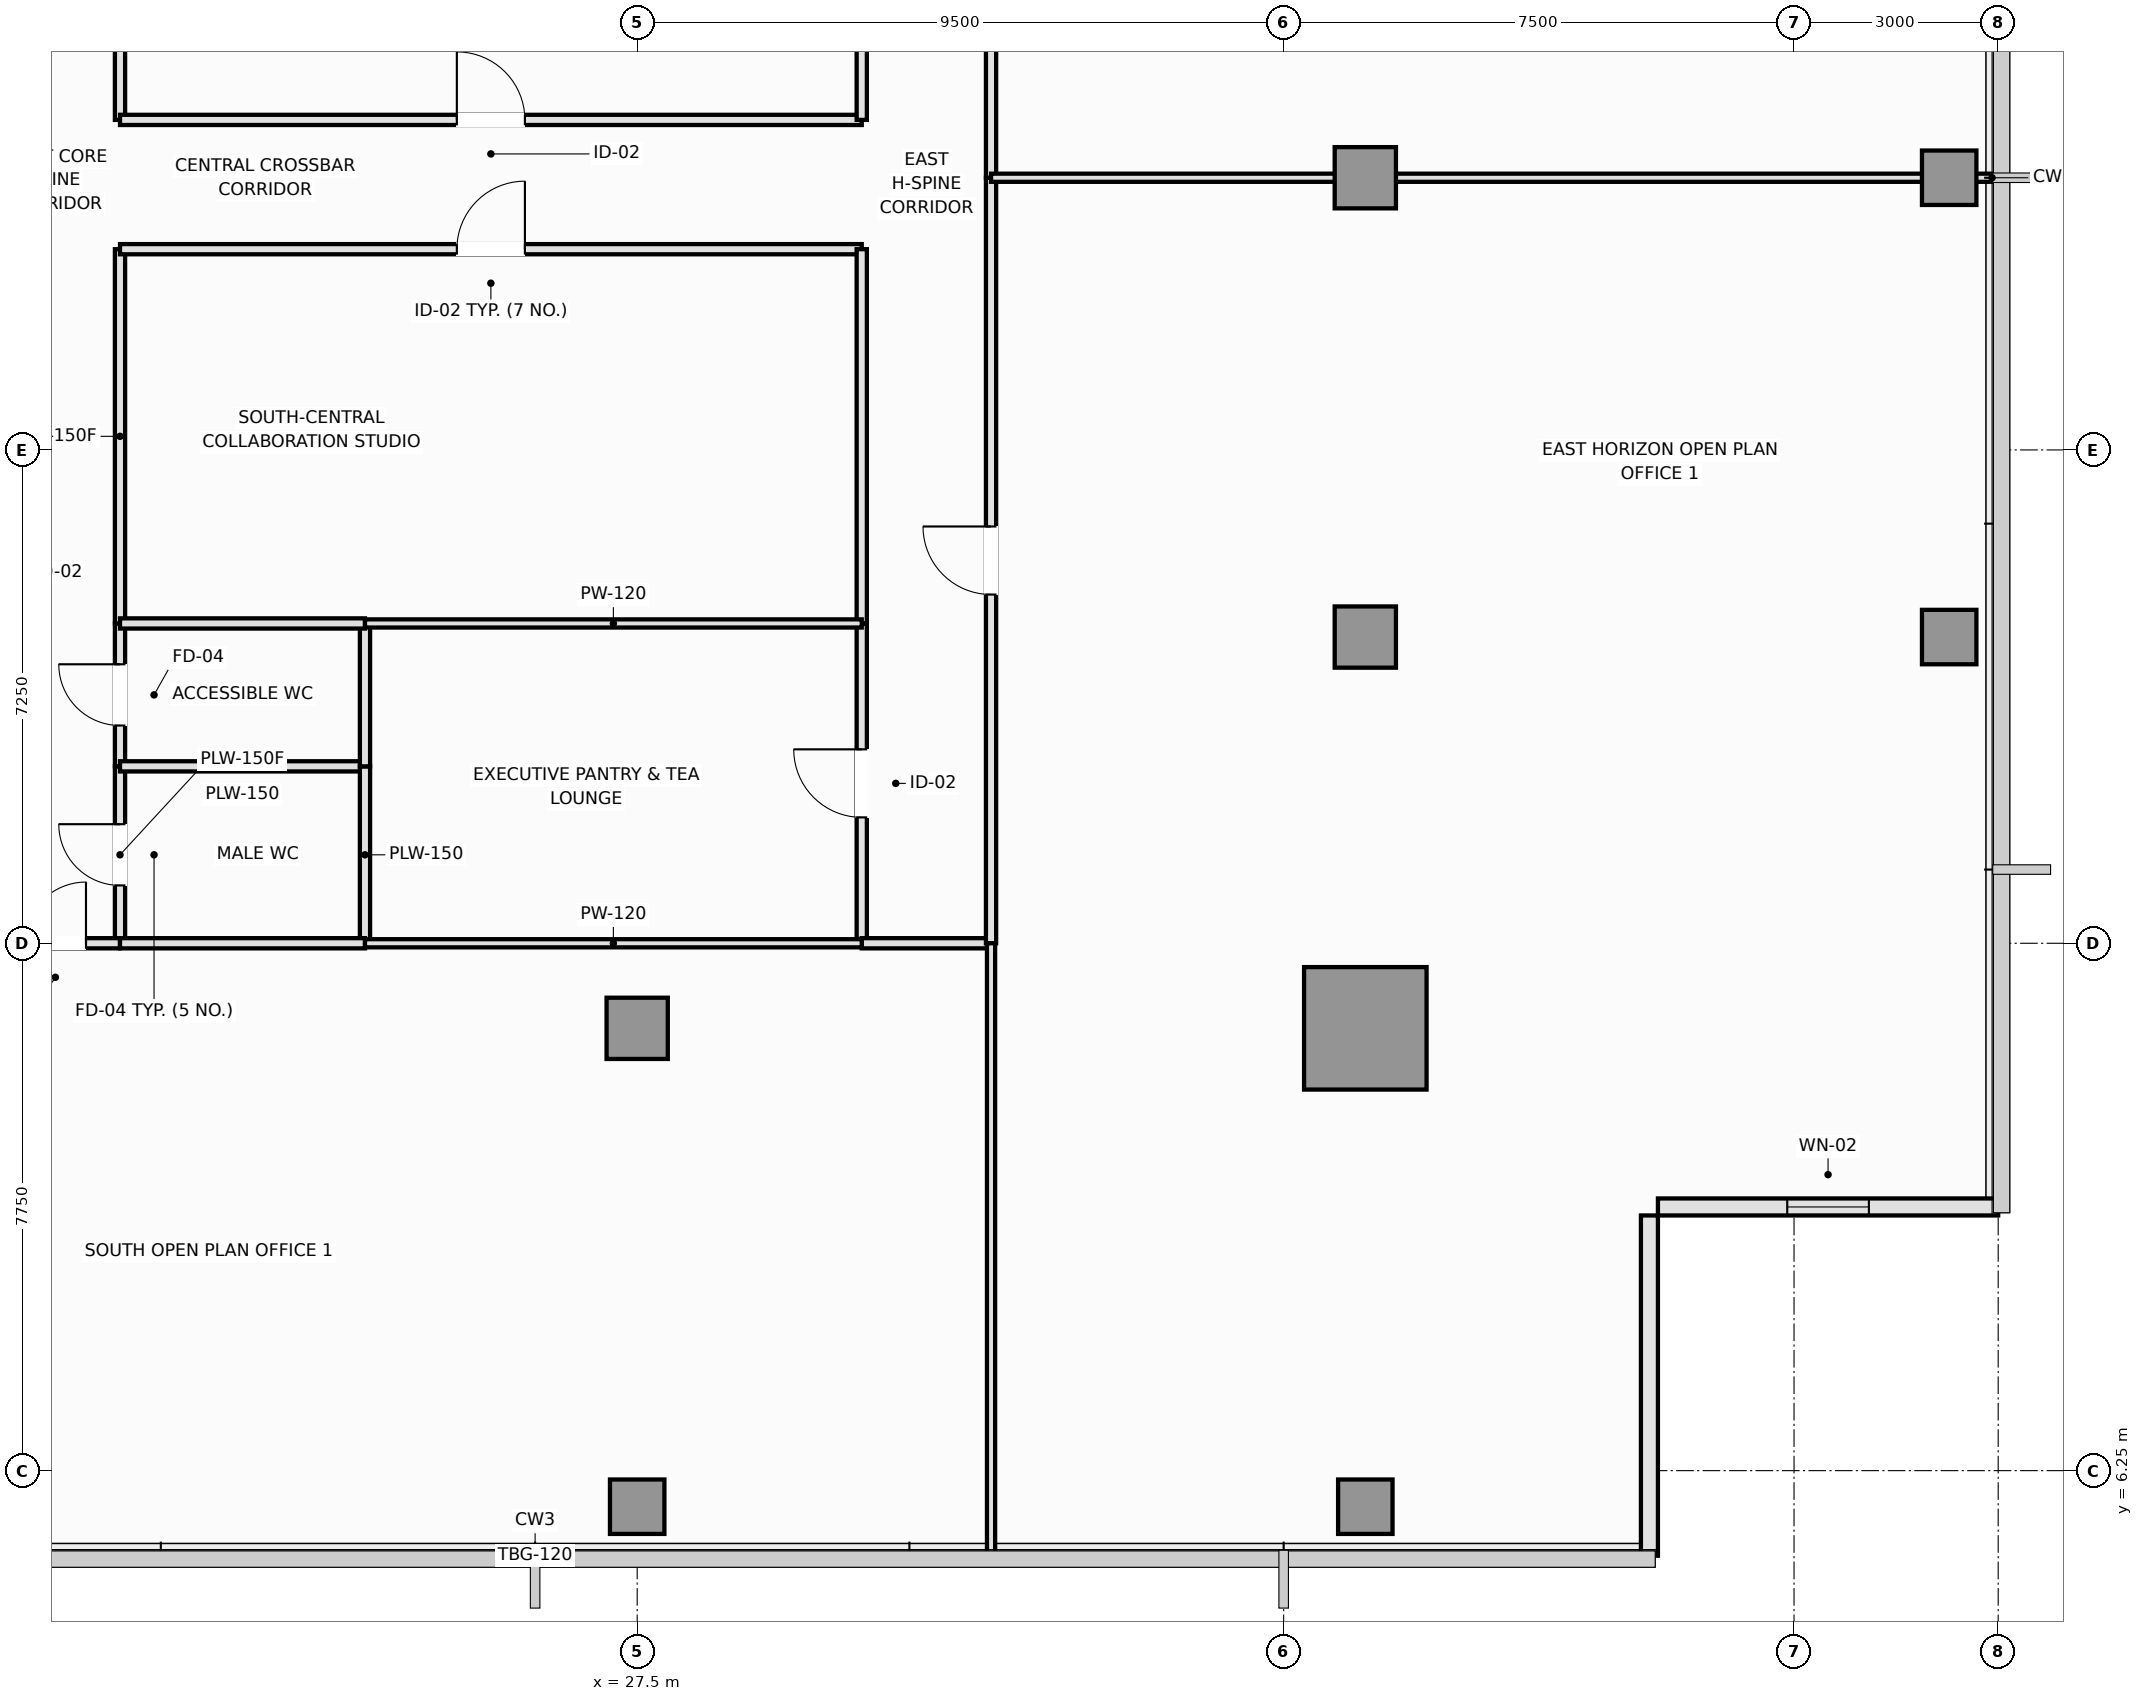
"""IFC4 building model, lengths in metres.
Left out: names, types, materials, properties, quantities, classifications, styles, units other than length and angle.
Written with IfcOpenShell. Run it as: python <this file> out.ifc"""

import sys

from ifc_helpers import new_model, si_unit, direction, frame, frame_2d, origin, origin_2d, place, context, subcontext, project, spatial, rectangle, extrude, element, fill, save


model = new_model("IFC4")
c1 = context("Model", 3, precision=1e-05, world=origin(), true_north=direction((0.0, 1.0)))
c2 = subcontext(c1, "Body", "Model", "MODEL_VIEW")
j1 = project(units=[si_unit("LENGTHUNIT", "METRE"), si_unit("PLANEANGLEUNIT", "RADIAN")], contexts=[c1])
p1 = place(None, origin())
s1 = spatial("IfcSite", under=j1, at=p1, CompositionType="ELEMENT")
p2 = place(p1, origin())
s2 = spatial("IfcBuilding", under=s1, at=p2, CompositionType="ELEMENT")
p3 = place(p2, frame((0.0, 0.0, 188.05)))
s3 = spatial("IfcBuildingStorey", under=s2, at=p3, CompositionType="ELEMENT", Elevation=188.05)
p4 = place(p3, frame((38.2, 12.75, 0.0), z_axis=(0.0, 0.0, 1.0), x_axis=(1.0, 0.0, 0.0)))
e1 = element("IfcColumn", 1, at=p4, inside=s3, PredefinedType="COLUMN", context=c2, shape_type="SweptSolid", body=[
    extrude(rectangle(XDim=1.8, YDim=1.8, at=origin_2d()), origin(), (0.0, 0.0, 1.0), 3.55),
])
for number, where, z_axis, x_axis in (
    (2, (27.5, 12.75, 0.0), (0.0, 0.0, 1.0), (1.0, 0.0, 0.0)),
    (3, (38.2, 18.5, 0.0), (0.0, 0.0, 1.0), (1.0, 0.0, 0.0)),
    (4, (38.2, 25.25, 0.0), (0.0, 0.0, 1.0), (1.0, 0.0, 0.0)),
):
    element("IfcColumn", number, at=place(p3, frame(where, z_axis=z_axis, x_axis=x_axis)), inside=s3, PredefinedType="COLUMN", context=c2, shape_type="SweptSolid", body=[
        extrude(rectangle(XDim=0.9, YDim=0.9, at=origin_2d()), origin(), (0.0, 0.0, 1.0), 3.55),
    ])
for number, where, z_axis, x_axis in (
    (5, (46.78, 18.5, 0.0), (0.0, 0.0, 1.0), (1.0, 0.0, 0.0)),
    (6, (46.78, 25.25, 0.0), (0.0, 0.0, 1.0), (1.0, 0.0, 0.0)),
    (7, (27.5, 5.72, 0.0), (0.0, 0.0, 1.0), (1.0, 0.0, 0.0)),
    (8, (38.2, 5.72, 0.0), (0.0, 0.0, 1.0), (1.0, 0.0, 0.0)),
):
    element("IfcColumn", number, at=place(p3, frame(where, z_axis=z_axis, x_axis=x_axis)), inside=s3, PredefinedType="COLUMN", context=c2, shape_type="SweptSolid", body=[
        extrude(rectangle(XDim=0.8, YDim=0.8, at=origin_2d()), origin(), (0.0, 0.0, 1.0), 3.55),
    ])
p5 = place(p3, frame((42.375, 5.0, 0.0), z_axis=(0.0, 0.0, 1.0), x_axis=(0.0, 1.0, 0.0)))
e9 = element("IfcWall", 9, at=p5, inside=s3, PredefinedType="SOLIDWALL", context=c2, shape_type="SweptSolid", body=[
    extrude(rectangle(XDim=5.0, YDim=0.25, at=frame_2d((2.5, 0.0))), origin(), (0.0, 0.0, 1.0), 3.37),
])
p6 = place(p3, frame((42.5, 10.125, 0.0), z_axis=(0.0, 0.0, 1.0), x_axis=(1.0, 0.0, 0.0)))
e10 = element("IfcWall", 10, at=p6, inside=s3, PredefinedType="SOLIDWALL", context=c2, shape_type="SweptSolid", body=[
    extrude(rectangle(XDim=5.0, YDim=0.25, at=frame_2d((2.5, 0.0))), origin(), (0.0, 0.0, 1.0), 3.37),
])
p7 = place(p6, frame((1.9, 0.0, 0.9)))
e11 = element("IfcOpeningElement", 11, at=p7, cuts=e10, PredefinedType="OPENING", context=c2, shape_type="SweptSolid", body=[
    extrude(rectangle(XDim=1.2, YDim=1.8, at=frame_2d((0.6, 0.9))), frame((0.0, 0.135, 0.0), z_axis=(0.0, -1.0, 0.0), x_axis=(1.0, 0.0, 0.0)), (0.0, 0.0, 1.0), 0.27),
])
p8 = place(p3, frame((19.9, 14.0, 0.0), z_axis=(0.0, 0.0, 1.0), x_axis=(0.0, 1.0, 0.0)))
e12 = element("IfcWall", 12, at=p8, inside=s3, PredefinedType="PLUMBINGWALL", context=c2, shape_type="SweptSolid", body=[
    extrude(rectangle(XDim=2.6, YDim=0.15, at=frame_2d((1.3, 0.0))), origin(), (0.0, 0.0, 1.0), 3.37),
])
p9 = place(p8, frame((0.85, 0.0, 0.0)))
e13 = element("IfcOpeningElement", 13, at=p9, cuts=e12, PredefinedType="OPENING", context=c2, shape_type="SweptSolid", body=[
    extrude(rectangle(XDim=0.9, YDim=2.1, at=frame_2d((0.45, 1.05))), frame((0.0, 0.085, 0.0), z_axis=(0.0, -1.0, 0.0), x_axis=(1.0, 0.0, 0.0)), (0.0, 0.0, 1.0), 0.17),
])
p10 = place(p3, frame((19.9, 16.6, 0.0), z_axis=(0.0, 0.0, 1.0), x_axis=(0.0, 1.0, 0.0)))
e14 = element("IfcWall", 14, at=p10, inside=s3, PredefinedType="PLUMBINGWALL", context=c2, shape_type="SweptSolid", body=[
    extrude(rectangle(XDim=2.1, YDim=0.15, at=frame_2d((1.05, 0.0))), origin(), (0.0, 0.0, 1.0), 3.37),
])
p11 = place(p10, frame((0.6, 0.0, 0.0)))
e15 = element("IfcOpeningElement", 15, at=p11, cuts=e14, PredefinedType="OPENING", context=c2, shape_type="SweptSolid", body=[
    extrude(rectangle(XDim=0.9, YDim=2.1, at=frame_2d((0.45, 1.05))), frame((0.0, 0.085, 0.0), z_axis=(0.0, -1.0, 0.0), x_axis=(1.0, 0.0, 0.0)), (0.0, 0.0, 1.0), 0.17),
])
p12 = place(p3, frame((19.9, 18.7, 0.0), z_axis=(0.0, 0.0, 1.0), x_axis=(0.0, 1.0, 0.0)))
e16 = element("IfcWall", 16, at=p12, inside=s3, PredefinedType="PARTITIONING", context=c2, shape_type="SweptSolid", body=[
    extrude(rectangle(XDim=5.5, YDim=0.15, at=frame_2d((2.75, 0.0))), origin(), (0.0, 0.0, 1.0), 3.37),
])
p13 = place(p3, frame((19.9, 26.1, 0.0), z_axis=(0.0, 0.0, 1.0), x_axis=(0.0, 1.0, 0.0)))
e17 = element("IfcWall", 17, at=p13, inside=s3, PredefinedType="PARTITIONING", context=c2, shape_type="SweptSolid", body=[
    extrude(rectangle(XDim=3.8, YDim=0.15, at=frame_2d((1.9, 0.0))), origin(), (0.0, 0.0, 1.0), 3.37),
])
p14 = place(p3, frame((18.0, 14.0, 0.0), z_axis=(0.0, 0.0, 1.0), x_axis=(1.0, 0.0, 0.0)))
e18 = element("IfcWall", 18, at=p14, inside=s3, PredefinedType="PARTITIONING", context=c2, shape_type="SweptSolid", body=[
    extrude(rectangle(XDim=1.9, YDim=0.15, at=frame_2d((0.95, 0.0))), origin(), (0.0, 0.0, 1.0), 3.37),
])
p15 = place(p14, frame((0.5, 0.0, 0.0)))
e19 = element("IfcOpeningElement", 19, at=p15, cuts=e18, PredefinedType="OPENING", context=c2, shape_type="SweptSolid", body=[
    extrude(rectangle(XDim=0.9, YDim=2.1, at=frame_2d((0.45, 1.05))), frame((0.0, 0.085, 0.0), z_axis=(0.0, -1.0, 0.0), x_axis=(1.0, 0.0, 0.0)), (0.0, 0.0, 1.0), 0.17),
])
p16 = place(p3, frame((19.9, 24.2, 0.0), z_axis=(0.0, 0.0, 1.0), x_axis=(1.0, 0.0, 0.0)))
e20 = element("IfcWall", 20, at=p16, inside=s3, PredefinedType="PARTITIONING", context=c2, shape_type="SweptSolid", body=[
    extrude(rectangle(XDim=10.9, YDim=0.15, at=frame_2d((5.45, 0.0))), origin(), (0.0, 0.0, 1.0), 3.37),
])
p17 = place(p16, frame((4.95, 0.0, 0.0)))
e21 = element("IfcOpeningElement", 21, at=p17, cuts=e20, PredefinedType="OPENING", context=c2, shape_type="SweptSolid", body=[
    extrude(rectangle(XDim=1.0, YDim=2.15, at=frame_2d((0.5, 1.075))), frame((0.0, 0.085, 0.0), z_axis=(0.0, -1.0, 0.0), x_axis=(1.0, 0.0, 0.0)), (0.0, 0.0, 1.0), 0.17),
])
p18 = place(p3, frame((19.9, 26.1, 0.0), z_axis=(0.0, 0.0, 1.0), x_axis=(1.0, 0.0, 0.0)))
e22 = element("IfcWall", 22, at=p18, inside=s3, PredefinedType="PARTITIONING", context=c2, shape_type="SweptSolid", body=[
    extrude(rectangle(XDim=10.9, YDim=0.15, at=frame_2d((5.45, 0.0))), origin(), (0.0, 0.0, 1.0), 3.37),
])
p19 = place(p18, frame((4.95, 0.0, 0.0)))
e23 = element("IfcOpeningElement", 23, at=p19, cuts=e22, PredefinedType="OPENING", context=c2, shape_type="SweptSolid", body=[
    extrude(rectangle(XDim=1.0, YDim=2.15, at=frame_2d((0.5, 1.075))), frame((0.0, 0.085, 0.0), z_axis=(0.0, -1.0, 0.0), x_axis=(1.0, 0.0, 0.0)), (0.0, 0.0, 1.0), 0.17),
])
p20 = place(p3, frame((30.8, 14.0, 0.0), z_axis=(0.0, 0.0, 1.0), x_axis=(0.0, 1.0, 0.0)))
e24 = element("IfcWall", 24, at=p20, inside=s3, PredefinedType="PARTITIONING", context=c2, shape_type="SweptSolid", body=[
    extrude(rectangle(XDim=4.7, YDim=0.15, at=frame_2d((2.35, 0.0))), origin(), (0.0, 0.0, 1.0), 3.37),
])
p21 = place(p20, frame((1.85, 0.0, 0.0)))
e25 = element("IfcOpeningElement", 25, at=p21, cuts=e24, PredefinedType="OPENING", context=c2, shape_type="SweptSolid", body=[
    extrude(rectangle(XDim=1.0, YDim=2.15, at=frame_2d((0.5, 1.075))), frame((0.0, 0.085, 0.0), z_axis=(0.0, -1.0, 0.0), x_axis=(1.0, 0.0, 0.0)), (0.0, 0.0, 1.0), 0.17),
])
p22 = place(p3, frame((30.8, 18.7, 0.0), z_axis=(0.0, 0.0, 1.0), x_axis=(0.0, 1.0, 0.0)))
e26 = element("IfcWall", 26, at=p22, inside=s3, PredefinedType="PARTITIONING", context=c2, shape_type="SweptSolid", body=[
    extrude(rectangle(XDim=5.5, YDim=0.15, at=frame_2d((2.75, 0.0))), origin(), (0.0, 0.0, 1.0), 3.37),
])
p23 = place(p3, frame((30.8, 26.1, 0.0), z_axis=(0.0, 0.0, 1.0), x_axis=(0.0, 1.0, 0.0)))
e27 = element("IfcWall", 27, at=p23, inside=s3, PredefinedType="PARTITIONING", context=c2, shape_type="SweptSolid", body=[
    extrude(rectangle(XDim=3.8, YDim=0.15, at=frame_2d((1.9, 0.0))), origin(), (0.0, 0.0, 1.0), 3.37),
])
p24 = place(p3, frame((30.8, 14.0, 0.0), z_axis=(0.0, 0.0, 1.0), x_axis=(1.0, 0.0, 0.0)))
e28 = element("IfcWall", 28, at=p24, inside=s3, PredefinedType="PARTITIONING", context=c2, shape_type="SweptSolid", body=[
    extrude(rectangle(XDim=1.9, YDim=0.15, at=frame_2d((0.95, 0.0))), origin(), (0.0, 0.0, 1.0), 3.37),
])
p25 = place(p3, frame((32.7, 14.0, 0.0), z_axis=(0.0, 0.0, 1.0), x_axis=(0.0, 1.0, 0.0)))
e29 = element("IfcWall", 29, at=p25, inside=s3, PredefinedType="PARTITIONING", context=c2, shape_type="SweptSolid", body=[
    extrude(rectangle(XDim=11.25, YDim=0.15, at=frame_2d((5.625, 0.0))), origin(), (0.0, 0.0, 1.0), 3.37),
])
p26 = place(p25, frame((5.125, 0.0, 0.0)))
e30 = element("IfcOpeningElement", 30, at=p26, cuts=e29, PredefinedType="OPENING", context=c2, shape_type="SweptSolid", body=[
    extrude(rectangle(XDim=1.0, YDim=2.15, at=frame_2d((0.5, 1.075))), frame((0.0, 0.085, 0.0), z_axis=(0.0, -1.0, 0.0), x_axis=(1.0, 0.0, 0.0)), (0.0, 0.0, 1.0), 0.17),
])
p27 = place(p3, frame((32.7, 25.25, 0.0), z_axis=(0.0, 0.0, 1.0), x_axis=(0.0, 1.0, 0.0)))
e31 = element("IfcWall", 31, at=p27, inside=s3, PredefinedType="PARTITIONING", context=c2, shape_type="SweptSolid", body=[
    extrude(rectangle(XDim=11.25, YDim=0.15, at=frame_2d((5.625, 0.0))), origin(), (0.0, 0.0, 1.0), 3.37),
])
p28 = place(p27, frame((5.125, 0.0, 0.0)))
e32 = element("IfcOpeningElement", 32, at=p28, cuts=e31, PredefinedType="OPENING", context=c2, shape_type="SweptSolid", body=[
    extrude(rectangle(XDim=1.0, YDim=2.15, at=frame_2d((0.5, 1.075))), frame((0.0, 0.085, 0.0), z_axis=(0.0, -1.0, 0.0), x_axis=(1.0, 0.0, 0.0)), (0.0, 0.0, 1.0), 0.17),
])
p29 = place(p3, frame((19.9, 16.6, 0.0), z_axis=(0.0, 0.0, 1.0), x_axis=(1.0, 0.0, 0.0)))
e33 = element("IfcWall", 33, at=p29, inside=s3, PredefinedType="PLUMBINGWALL", context=c2, shape_type="SweptSolid", body=[
    extrude(rectangle(XDim=3.6, YDim=0.15, at=frame_2d((1.8, 0.0))), origin(), (0.0, 0.0, 1.0), 3.37),
])
p30 = place(p3, frame((23.5, 14.0, 0.0), z_axis=(0.0, 0.0, 1.0), x_axis=(0.0, 1.0, 0.0)))
e34 = element("IfcWall", 34, at=p30, inside=s3, PredefinedType="PLUMBINGWALL", context=c2, shape_type="SweptSolid", body=[
    extrude(rectangle(XDim=2.6, YDim=0.15, at=frame_2d((1.3, 0.0))), origin(), (0.0, 0.0, 1.0), 3.37),
])
p31 = place(p3, frame((19.9, 14.0, 0.0), z_axis=(0.0, 0.0, 1.0), x_axis=(1.0, 0.0, 0.0)))
e35 = element("IfcWall", 35, at=p31, inside=s3, PredefinedType="PLUMBINGWALL", context=c2, shape_type="SweptSolid", body=[
    extrude(rectangle(XDim=3.6, YDim=0.15, at=frame_2d((1.8, 0.0))), origin(), (0.0, 0.0, 1.0), 3.37),
])
p32 = place(p3, frame((23.5, 16.6, 0.0), z_axis=(0.0, 0.0, 1.0), x_axis=(0.0, 1.0, 0.0)))
e36 = element("IfcWall", 36, at=p32, inside=s3, PredefinedType="PLUMBINGWALL", context=c2, shape_type="SweptSolid", body=[
    extrude(rectangle(XDim=2.1, YDim=0.15, at=frame_2d((1.05, 0.0))), origin(), (0.0, 0.0, 1.0), 3.37),
])
p33 = place(p3, frame((19.9, 18.7, 0.0), z_axis=(0.0, 0.0, 1.0), x_axis=(1.0, 0.0, 0.0)))
e37 = element("IfcWall", 37, at=p33, inside=s3, PredefinedType="PLUMBINGWALL", context=c2, shape_type="SweptSolid", body=[
    extrude(rectangle(XDim=3.6, YDim=0.15, at=frame_2d((1.8, 0.0))), origin(), (0.0, 0.0, 1.0), 3.37),
])
for number, where, z_axis, x_axis in (
    (38, (23.5, 18.7, 0.0), (0.0, 0.0, 1.0), (1.0, 0.0, 0.0)),
    (39, (23.5, 14.0, 0.0), (0.0, 0.0, 1.0), (1.0, 0.0, 0.0)),
):
    element("IfcWall", number, at=place(p3, frame(where, z_axis=z_axis, x_axis=x_axis)), inside=s3, PredefinedType="PARTITIONING", context=c2, shape_type="SweptSolid", body=[
        extrude(rectangle(XDim=7.3, YDim=0.12, at=frame_2d((3.65, 0.0))), origin(), (0.0, 0.0, 1.0), 3.37),
    ])
p34 = place(p3, frame((32.7, 5.01, 0.0), z_axis=(0.0, 0.0, 1.0), x_axis=(0.0, 1.0, 0.0)))
e40 = element("IfcWall", 40, at=p34, inside=s3, PredefinedType="PARTITIONING", context=c2, shape_type="SweptSolid", body=[
    extrude(rectangle(XDim=8.99, YDim=0.12, at=frame_2d((4.495, 0.0))), origin(), (0.0, 0.0, 1.0), 3.37),
])
p35 = place(p3, frame((32.7, 25.25, 0.0), z_axis=(0.0, 0.0, 1.0), x_axis=(1.0, 0.0, 0.0)))
e41 = element("IfcWall", 41, at=p35, inside=s3, PredefinedType="PARTITIONING", context=c2, shape_type="SweptSolid", body=[
    extrude(rectangle(XDim=14.79, YDim=0.12, at=frame_2d((7.395, 0.0))), origin(), (0.0, 0.0, 1.0), 2.87),
])
p36 = place(p7, origin())
e42 = element("IfcWindow", 42, at=p36, inside=s3, PartitioningType="SINGLE_PANEL", PredefinedType="WINDOW", context=c2, shape_type="SweptSolid", body=[
    extrude(rectangle(XDim=1.2, YDim=1.8, at=frame_2d((0.6, 0.9))), frame((0.0, 0.03, 0.0), z_axis=(0.0, -1.0, 0.0), x_axis=(1.0, 0.0, 0.0)), (0.0, 0.0, 1.0), 0.06),
])
fill(e11, e42)
p37 = place(p9, origin())
e43 = element("IfcDoor", 43, at=p37, inside=s3, OperationType="SINGLE_SWING_RIGHT", PredefinedType="DOOR", context=c2, shape_type="SweptSolid", body=[
    extrude(rectangle(XDim=0.9, YDim=2.1, at=frame_2d((0.45, 1.05))), frame((0.0, 0.025, 0.0), z_axis=(0.0, -1.0, 0.0), x_axis=(1.0, 0.0, 0.0)), (0.0, 0.0, 1.0), 0.05),
])
fill(e13, e43)
p38 = place(p11, origin())
e44 = element("IfcDoor", 44, at=p38, inside=s3, OperationType="SINGLE_SWING_RIGHT", PredefinedType="DOOR", context=c2, shape_type="SweptSolid", body=[
    extrude(rectangle(XDim=0.9, YDim=2.1, at=frame_2d((0.45, 1.05))), frame((0.0, 0.025, 0.0), z_axis=(0.0, -1.0, 0.0), x_axis=(1.0, 0.0, 0.0)), (0.0, 0.0, 1.0), 0.05),
])
fill(e15, e44)
p39 = place(p15, origin())
e45 = element("IfcDoor", 45, at=p39, inside=s3, OperationType="SINGLE_SWING_RIGHT", PredefinedType="DOOR", context=c2, shape_type="SweptSolid", body=[
    extrude(rectangle(XDim=0.9, YDim=2.1, at=frame_2d((0.45, 1.05))), frame((0.0, 0.025, 0.0), z_axis=(0.0, -1.0, 0.0), x_axis=(1.0, 0.0, 0.0)), (0.0, 0.0, 1.0), 0.05),
])
fill(e19, e45)
p40 = place(p17, origin())
e46 = element("IfcDoor", 46, at=p40, inside=s3, OperationType="SINGLE_SWING_RIGHT", PredefinedType="DOOR", context=c2, shape_type="SweptSolid", body=[
    extrude(rectangle(XDim=1.0, YDim=2.15, at=frame_2d((0.5, 1.075))), frame((0.0, 0.025, 0.0), z_axis=(0.0, -1.0, 0.0), x_axis=(1.0, 0.0, 0.0)), (0.0, 0.0, 1.0), 0.05),
])
fill(e21, e46)
p41 = place(p19, origin())
e47 = element("IfcDoor", 47, at=p41, inside=s3, OperationType="SINGLE_SWING_LEFT", PredefinedType="DOOR", context=c2, shape_type="SweptSolid", body=[
    extrude(rectangle(XDim=1.0, YDim=2.15, at=frame_2d((0.5, 1.075))), frame((0.0, 0.025, 0.0), z_axis=(0.0, -1.0, 0.0), x_axis=(1.0, 0.0, 0.0)), (0.0, 0.0, 1.0), 0.05),
])
fill(e23, e47)
p42 = place(p21, origin())
e48 = element("IfcDoor", 48, at=p42, inside=s3, OperationType="SINGLE_SWING_RIGHT", PredefinedType="DOOR", context=c2, shape_type="SweptSolid", body=[
    extrude(rectangle(XDim=1.0, YDim=2.15, at=frame_2d((0.5, 1.075))), frame((0.0, 0.025, 0.0), z_axis=(0.0, -1.0, 0.0), x_axis=(1.0, 0.0, 0.0)), (0.0, 0.0, 1.0), 0.05),
])
fill(e25, e48)
p43 = place(p26, origin())
e49 = element("IfcDoor", 49, at=p43, inside=s3, OperationType="SINGLE_SWING_RIGHT", PredefinedType="DOOR", context=c2, shape_type="SweptSolid", body=[
    extrude(rectangle(XDim=1.0, YDim=2.15, at=frame_2d((0.5, 1.075))), frame((0.0, 0.025, 0.0), z_axis=(0.0, -1.0, 0.0), x_axis=(1.0, 0.0, 0.0)), (0.0, 0.0, 1.0), 0.05),
])
fill(e30, e49)
save(model, sys.argv[1])
